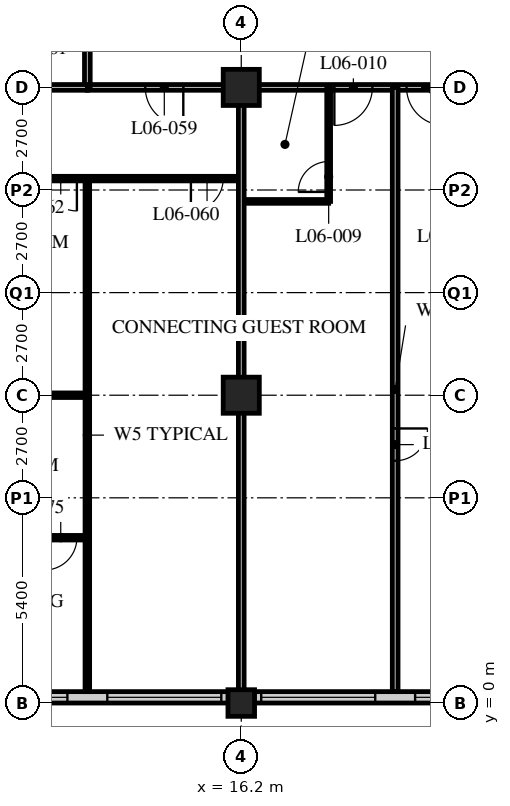
"""IFC4 building model, lengths in metres.
Left out: names, types, materials, properties, quantities, classifications, styles, units other than length and angle.
Written with IfcOpenShell. Run it as: python <this file> out.ifc"""

import sys

from ifc_helpers import new_model, si_unit, direction, frame, frame_2d, origin, origin_2d, place, context, subcontext, project, spatial, rectangle, hollow_rectangle, extrude, element, fill, save


model = new_model("IFC4")
c1 = context("Model", 3, precision=1e-05, world=origin(), true_north=direction((0.0, 1.0)))
c2 = subcontext(c1, "Body", "Model", "MODEL_VIEW")
j1 = project(units=[si_unit("LENGTHUNIT", "METRE"), si_unit("PLANEANGLEUNIT", "RADIAN")], contexts=[c1])
p1 = place(None, origin())
s1 = spatial("IfcSite", under=j1, at=p1, CompositionType="ELEMENT")
p2 = place(p1, origin())
s2 = spatial("IfcBuilding", under=s1, at=p2, CompositionType="ELEMENT")
p3 = place(p2, frame((0.0, 0.0, 33.0)))
s3 = spatial("IfcBuildingStorey", under=s2, at=p3, CompositionType="ELEMENT", Elevation=33.0)
p4 = place(p3, frame((16.2, 0.0, 0.0), z_axis=(0.0, 0.0, 1.0), x_axis=(1.0, 0.0, 0.0)))
e1 = element("IfcColumn", 1, at=p4, inside=s3, PredefinedType="COLUMN", context=c2, shape_type="SweptSolid", body=[
    extrude(hollow_rectangle(XDim=0.7, YDim=0.7, WallThickness=0.06, at=origin_2d()), origin(), (0.0, 0.0, 1.0), 3.4),
])
for number, where, z_axis, x_axis in (
    (2, (16.2, 8.1, 0.0), (0.0, 0.0, 1.0), (1.0, 0.0, 0.0)),
    (3, (16.2, 16.2, 0.0), (0.0, 0.0, 1.0), (1.0, 0.0, 0.0)),
):
    element("IfcColumn", number, at=place(p3, frame(where, z_axis=z_axis, x_axis=x_axis)), inside=s3, PredefinedType="COLUMN", context=c2, shape_type="SweptSolid", body=[
        extrude(hollow_rectangle(XDim=0.95, YDim=0.95, WallThickness=0.095, at=origin_2d()), origin(), (0.0, 0.0, 1.0), 3.4),
    ])
p5 = place(p3, frame((8.4, 0.15, 0.0), z_axis=(0.0, 0.0, 1.0), x_axis=(1.0, 0.0, 0.0)))
e4 = element("IfcWall", 4, at=p5, inside=s3, PredefinedType="SOLIDWALL", context=c2, shape_type="SweptSolid", body=[
    extrude(rectangle(XDim=40.2, YDim=0.3, at=frame_2d((20.1, 0.0))), origin(), (0.0, 0.0, 1.0), 3.19),
])
p6 = place(p5, frame((0.225, 0.0, 0.9)))
e5 = element("IfcOpeningElement", 5, at=p6, cuts=e4, PredefinedType="OPENING", context=c2, shape_type="SweptSolid", body=[
    extrude(rectangle(XDim=3.0, YDim=2.0, at=frame_2d((1.5, 1.0))), frame((0.0, 0.16, 0.0), z_axis=(0.0, -1.0, 0.0), x_axis=(1.0, 0.0, 0.0)), (0.0, 0.0, 1.0), 0.32),
])
p7 = place(p5, frame((4.275, 0.0, 0.9)))
e6 = element("IfcOpeningElement", 6, at=p7, cuts=e4, PredefinedType="OPENING", context=c2, shape_type="SweptSolid", body=[
    extrude(rectangle(XDim=3.0, YDim=2.0, at=frame_2d((1.5, 1.0))), frame((0.0, 0.16, 0.0), z_axis=(0.0, -1.0, 0.0), x_axis=(1.0, 0.0, 0.0)), (0.0, 0.0, 1.0), 0.32),
])
p8 = place(p5, frame((8.325, 0.0, 0.9)))
e7 = element("IfcOpeningElement", 7, at=p8, cuts=e4, PredefinedType="OPENING", context=c2, shape_type="SweptSolid", body=[
    extrude(rectangle(XDim=3.0, YDim=2.0, at=frame_2d((1.5, 1.0))), frame((0.0, 0.16, 0.0), z_axis=(0.0, -1.0, 0.0), x_axis=(1.0, 0.0, 0.0)), (0.0, 0.0, 1.0), 0.32),
])
p9 = place(p5, frame((12.375, 0.0, 0.9)))
e8 = element("IfcOpeningElement", 8, at=p9, cuts=e4, PredefinedType="OPENING", context=c2, shape_type="SweptSolid", body=[
    extrude(rectangle(XDim=3.0, YDim=2.0, at=frame_2d((1.5, 1.0))), frame((0.0, 0.16, 0.0), z_axis=(0.0, -1.0, 0.0), x_axis=(1.0, 0.0, 0.0)), (0.0, 0.0, 1.0), 0.32),
])
p10 = place(p5, frame((16.425, 0.0, 0.9)))
e9 = element("IfcOpeningElement", 9, at=p10, cuts=e4, PredefinedType="OPENING", context=c2, shape_type="SweptSolid", body=[
    extrude(rectangle(XDim=3.0, YDim=2.0, at=frame_2d((1.5, 1.0))), frame((0.0, 0.16, 0.0), z_axis=(0.0, -1.0, 0.0), x_axis=(1.0, 0.0, 0.0)), (0.0, 0.0, 1.0), 0.32),
])
p11 = place(p5, frame((20.475, 0.0, 0.9)))
e10 = element("IfcOpeningElement", 10, at=p11, cuts=e4, PredefinedType="OPENING", context=c2, shape_type="SweptSolid", body=[
    extrude(rectangle(XDim=3.0, YDim=2.0, at=frame_2d((1.5, 1.0))), frame((0.0, 0.16, 0.0), z_axis=(0.0, -1.0, 0.0), x_axis=(1.0, 0.0, 0.0)), (0.0, 0.0, 1.0), 0.32),
])
p12 = place(p5, frame((24.525, 0.0, 0.9)))
e11 = element("IfcOpeningElement", 11, at=p12, cuts=e4, PredefinedType="OPENING", context=c2, shape_type="SweptSolid", body=[
    extrude(rectangle(XDim=3.0, YDim=2.0, at=frame_2d((1.5, 1.0))), frame((0.0, 0.16, 0.0), z_axis=(0.0, -1.0, 0.0), x_axis=(1.0, 0.0, 0.0)), (0.0, 0.0, 1.0), 0.32),
])
p13 = place(p5, frame((28.575, 0.0, 0.9)))
e12 = element("IfcOpeningElement", 12, at=p13, cuts=e4, PredefinedType="OPENING", context=c2, shape_type="SweptSolid", body=[
    extrude(rectangle(XDim=3.0, YDim=2.0, at=frame_2d((1.5, 1.0))), frame((0.0, 0.16, 0.0), z_axis=(0.0, -1.0, 0.0), x_axis=(1.0, 0.0, 0.0)), (0.0, 0.0, 1.0), 0.32),
])
p14 = place(p5, frame((32.625, 0.0, 0.9)))
e13 = element("IfcOpeningElement", 13, at=p14, cuts=e4, PredefinedType="OPENING", context=c2, shape_type="SweptSolid", body=[
    extrude(rectangle(XDim=3.0, YDim=2.0, at=frame_2d((1.5, 1.0))), frame((0.0, 0.16, 0.0), z_axis=(0.0, -1.0, 0.0), x_axis=(1.0, 0.0, 0.0)), (0.0, 0.0, 1.0), 0.32),
])
p15 = place(p5, frame((36.675, 0.0, 0.9)))
e14 = element("IfcOpeningElement", 14, at=p15, cuts=e4, PredefinedType="OPENING", context=c2, shape_type="SweptSolid", body=[
    extrude(rectangle(XDim=3.0, YDim=2.0, at=frame_2d((1.5, 1.0))), frame((0.0, 0.16, 0.0), z_axis=(0.0, -1.0, 0.0), x_axis=(1.0, 0.0, 0.0)), (0.0, 0.0, 1.0), 0.32),
])
p16 = place(p3, frame((12.15, 16.2, 0.0), z_axis=(0.0, 0.0, 1.0), x_axis=(1.0, 0.0, 0.0)))
e15 = element("IfcWall", 15, at=p16, inside=s3, PredefinedType="PARTITIONING", context=c2, shape_type="SweptSolid", body=[
    extrude(rectangle(XDim=32.4, YDim=0.15, at=frame_2d((16.2, 0.0))), origin(), (0.0, 0.0, 1.0), 2.578),
])
p17 = place(p16, frame((6.5, 0.0, 0.0)))
e16 = element("IfcOpeningElement", 16, at=p17, cuts=e15, PredefinedType="OPENING", context=c2, shape_type="SweptSolid", body=[
    extrude(rectangle(XDim=1.0, YDim=2.1, at=frame_2d((0.5, 1.05))), frame((0.0, 0.085, 0.0), z_axis=(0.0, -1.0, 0.0), x_axis=(1.0, 0.0, 0.0)), (0.0, 0.0, 1.0), 0.17),
])
p18 = place(p16, frame((8.4, 0.0, 0.0)))
e17 = element("IfcOpeningElement", 17, at=p18, cuts=e15, PredefinedType="OPENING", context=c2, shape_type="SweptSolid", body=[
    extrude(rectangle(XDim=1.0, YDim=2.1, at=frame_2d((0.5, 1.05))), frame((0.0, 0.085, 0.0), z_axis=(0.0, -1.0, 0.0), x_axis=(1.0, 0.0, 0.0)), (0.0, 0.0, 1.0), 0.17),
])
p19 = place(p16, frame((14.6, 0.0, 0.0)))
e18 = element("IfcOpeningElement", 18, at=p19, cuts=e15, PredefinedType="OPENING", context=c2, shape_type="SweptSolid", body=[
    extrude(rectangle(XDim=1.0, YDim=2.1, at=frame_2d((0.5, 1.05))), frame((0.0, 0.085, 0.0), z_axis=(0.0, -1.0, 0.0), x_axis=(1.0, 0.0, 0.0)), (0.0, 0.0, 1.0), 0.17),
])
p20 = place(p16, frame((16.5, 0.0, 0.0)))
e19 = element("IfcOpeningElement", 19, at=p20, cuts=e15, PredefinedType="OPENING", context=c2, shape_type="SweptSolid", body=[
    extrude(rectangle(XDim=1.0, YDim=2.1, at=frame_2d((0.5, 1.05))), frame((0.0, 0.085, 0.0), z_axis=(0.0, -1.0, 0.0), x_axis=(1.0, 0.0, 0.0)), (0.0, 0.0, 1.0), 0.17),
])
p21 = place(p16, frame((23.0, 0.0, 0.0)))
e20 = element("IfcOpeningElement", 20, at=p21, cuts=e15, PredefinedType="OPENING", context=c2, shape_type="SweptSolid", body=[
    extrude(rectangle(XDim=1.0, YDim=2.1, at=frame_2d((0.5, 1.05))), frame((0.0, 0.085, 0.0), z_axis=(0.0, -1.0, 0.0), x_axis=(1.0, 0.0, 0.0)), (0.0, 0.0, 1.0), 0.17),
])
p22 = place(p16, frame((24.6, 0.0, 0.0)))
e21 = element("IfcOpeningElement", 21, at=p22, cuts=e15, PredefinedType="OPENING", context=c2, shape_type="SweptSolid", body=[
    extrude(rectangle(XDim=1.0, YDim=2.1, at=frame_2d((0.5, 1.05))), frame((0.0, 0.085, 0.0), z_axis=(0.0, -1.0, 0.0), x_axis=(1.0, 0.0, 0.0)), (0.0, 0.0, 1.0), 0.17),
])
p23 = place(p16, frame((1.525, 0.0, 0.0)))
e22 = element("IfcOpeningElement", 22, at=p23, cuts=e15, PredefinedType="OPENING", context=c2, shape_type="SweptSolid", body=[
    extrude(rectangle(XDim=1.0, YDim=2.1, at=frame_2d((0.5, 1.05))), frame((0.0, 0.085, 0.0), z_axis=(0.0, -1.0, 0.0), x_axis=(1.0, 0.0, 0.0)), (0.0, 0.0, 1.0), 0.17),
])
p24 = place(p16, frame((29.875, 0.0, 0.0)))
e23 = element("IfcOpeningElement", 23, at=p24, cuts=e15, PredefinedType="OPENING", context=c2, shape_type="SweptSolid", body=[
    extrude(rectangle(XDim=1.0, YDim=2.1, at=frame_2d((0.5, 1.05))), frame((0.0, 0.085, 0.0), z_axis=(0.0, -1.0, 0.0), x_axis=(1.0, 0.0, 0.0)), (0.0, 0.0, 1.0), 0.17),
])
p25 = place(p3, frame((12.15, 16.2, 0.0), z_axis=(0.0, 0.0, 1.0), x_axis=(0.0, 1.0, 0.0)))
e24 = element("IfcWall", 24, at=p25, inside=s3, PredefinedType="PARTITIONING", context=c2, shape_type="SweptSolid", body=[
    extrude(rectangle(XDim=26.1, YDim=0.15, at=frame_2d((13.05, 0.0))), origin(), (0.0, 0.0, 1.0), 3.19),
])
p26 = place(p25, frame((2.75, 0.0, 0.0)))
e25 = element("IfcOpeningElement", 25, at=p26, cuts=e24, PredefinedType="OPENING", context=c2, shape_type="SweptSolid", body=[
    extrude(rectangle(XDim=1.0, YDim=2.1, at=frame_2d((0.5, 1.05))), frame((0.0, 0.085, 0.0), z_axis=(0.0, -1.0, 0.0), x_axis=(1.0, 0.0, 0.0)), (0.0, 0.0, 1.0), 0.17),
])
p27 = place(p25, frame((4.35, 0.0, 0.0)))
e26 = element("IfcOpeningElement", 26, at=p27, cuts=e24, PredefinedType="OPENING", context=c2, shape_type="SweptSolid", body=[
    extrude(rectangle(XDim=1.0, YDim=2.1, at=frame_2d((0.5, 1.05))), frame((0.0, 0.085, 0.0), z_axis=(0.0, -1.0, 0.0), x_axis=(1.0, 0.0, 0.0)), (0.0, 0.0, 1.0), 0.17),
])
p28 = place(p25, frame((10.55, 0.0, 0.0)))
e27 = element("IfcOpeningElement", 27, at=p28, cuts=e24, PredefinedType="OPENING", context=c2, shape_type="SweptSolid", body=[
    extrude(rectangle(XDim=1.0, YDim=2.1, at=frame_2d((0.5, 1.05))), frame((0.0, 0.085, 0.0), z_axis=(0.0, -1.0, 0.0), x_axis=(1.0, 0.0, 0.0)), (0.0, 0.0, 1.0), 0.17),
])
p29 = place(p25, frame((12.45, 0.0, 0.0)))
e28 = element("IfcOpeningElement", 28, at=p29, cuts=e24, PredefinedType="OPENING", context=c2, shape_type="SweptSolid", body=[
    extrude(rectangle(XDim=1.0, YDim=2.1, at=frame_2d((0.5, 1.05))), frame((0.0, 0.085, 0.0), z_axis=(0.0, -1.0, 0.0), x_axis=(1.0, 0.0, 0.0)), (0.0, 0.0, 1.0), 0.17),
])
p30 = place(p25, frame((18.65, 0.0, 0.0)))
e29 = element("IfcOpeningElement", 29, at=p30, cuts=e24, PredefinedType="OPENING", context=c2, shape_type="SweptSolid", body=[
    extrude(rectangle(XDim=1.0, YDim=2.1, at=frame_2d((0.5, 1.05))), frame((0.0, 0.085, 0.0), z_axis=(0.0, -1.0, 0.0), x_axis=(1.0, 0.0, 0.0)), (0.0, 0.0, 1.0), 0.17),
])
p31 = place(p25, frame((22.65, 0.0, 0.0)))
e30 = element("IfcOpeningElement", 30, at=p31, cuts=e24, PredefinedType="OPENING", context=c2, shape_type="SweptSolid", body=[
    extrude(rectangle(XDim=1.0, YDim=2.1, at=frame_2d((0.5, 1.05))), frame((0.0, 0.085, 0.0), z_axis=(0.0, -1.0, 0.0), x_axis=(1.0, 0.0, 0.0)), (0.0, 0.0, 1.0), 0.17),
])
p32 = place(p3, frame((16.2, 13.2, 0.0), z_axis=(0.0, 0.0, 1.0), x_axis=(1.0, 0.0, 0.0)))
e31 = element("IfcWall", 31, at=p32, inside=s3, PredefinedType="PARTITIONING", context=c2, shape_type="SweptSolid", body=[
    extrude(rectangle(XDim=2.3, YDim=0.1, at=frame_2d((1.15, 0.0))), origin(), (0.0, 0.0, 1.0), 3.19),
])
p33 = place(p3, frame((18.5, 16.2, 0.0), z_axis=(0.0, 0.0, 1.0), x_axis=(0.0, -1.0, 0.0)))
e32 = element("IfcWall", 32, at=p33, inside=s3, PredefinedType="PARTITIONING", context=c2, shape_type="SweptSolid", body=[
    extrude(rectangle(XDim=3.0, YDim=0.1, at=frame_2d((1.5, 0.0))), origin(), (0.0, 0.0, 1.0), 3.19),
])
p34 = place(p33, frame((1.95, 0.0, 0.0)))
e33 = element("IfcOpeningElement", 33, at=p34, cuts=e32, PredefinedType="OPENING", context=c2, shape_type="SweptSolid", body=[
    extrude(rectangle(XDim=0.8, YDim=2.1, at=frame_2d((0.4, 1.05))), frame((0.0, 0.06, 0.0), z_axis=(0.0, -1.0, 0.0), x_axis=(1.0, 0.0, 0.0)), (0.0, 0.0, 1.0), 0.12),
])
p35 = place(p3, frame((20.25, 16.2, 0.0), z_axis=(0.0, 0.0, 1.0), x_axis=(0.0, -1.0, 0.0)))
e34 = element("IfcWall", 34, at=p35, inside=s3, PredefinedType="PARTITIONING", context=c2, shape_type="SweptSolid", body=[
    extrude(rectangle(XDim=15.9, YDim=0.15, at=frame_2d((7.95, 0.0))), origin(), (0.0, 0.0, 1.0), 3.19),
])
p36 = place(p35, frame((8.975, 0.0, 0.0)))
e35 = element("IfcOpeningElement", 35, at=p36, cuts=e34, PredefinedType="OPENING", context=c2, shape_type="SweptSolid", body=[
    extrude(rectangle(XDim=0.85, YDim=2.1, at=frame_2d((0.425, 1.05))), frame((0.0, 0.085, 0.0), z_axis=(0.0, -1.0, 0.0), x_axis=(1.0, 0.0, 0.0)), (0.0, 0.0, 1.0), 0.17),
])
p37 = place(p3, frame((8.15, 13.8, 0.0), z_axis=(0.0, 0.0, 1.0), x_axis=(1.0, 0.0, 0.0)))
e36 = element("IfcWall", 36, at=p37, inside=s3, PredefinedType="PARTITIONING", context=c2, shape_type="SweptSolid", body=[
    extrude(rectangle(XDim=8.05, YDim=0.12, at=frame_2d((4.025, 0.0))), origin(), (0.0, 0.0, 1.0), 3.19),
])
p38 = place(p37, frame((6.725, 0.0, 0.0)))
e37 = element("IfcOpeningElement", 37, at=p38, cuts=e36, PredefinedType="OPENING", context=c2, shape_type="SweptSolid", body=[
    extrude(rectangle(XDim=0.85, YDim=2.1, at=frame_2d((0.425, 1.05))), frame((0.0, 0.07, 0.0), z_axis=(0.0, -1.0, 0.0), x_axis=(1.0, 0.0, 0.0)), (0.0, 0.0, 1.0), 0.14),
])
p39 = place(p37, frame((2.875, 0.0, 0.0)))
e38 = element("IfcOpeningElement", 38, at=p39, cuts=e36, PredefinedType="OPENING", context=c2, shape_type="SweptSolid", body=[
    extrude(rectangle(XDim=0.85, YDim=2.1, at=frame_2d((0.425, 1.05))), frame((0.0, 0.07, 0.0), z_axis=(0.0, -1.0, 0.0), x_axis=(1.0, 0.0, 0.0)), (0.0, 0.0, 1.0), 0.14),
])
p40 = place(p3, frame((12.15, 13.8, 0.0), z_axis=(0.0, 0.0, 1.0), x_axis=(0.0, -1.0, 0.0)))
e39 = element("IfcWall", 39, at=p40, inside=s3, PredefinedType="PARTITIONING", context=c2, shape_type="SweptSolid", body=[
    extrude(rectangle(XDim=13.5, YDim=0.12, at=frame_2d((6.75, 0.0))), origin(), (0.0, 0.0, 1.0), 3.19),
])
p41 = place(p3, frame((12.15, 8.1, 0.0), z_axis=(0.0, 0.0, 1.0), x_axis=(-1.0, 0.0, 0.0)))
e40 = element("IfcWall", 40, at=p41, inside=s3, PredefinedType="PARTITIONING", context=c2, shape_type="SweptSolid", body=[
    extrude(rectangle(XDim=7.8, YDim=0.12, at=frame_2d((3.9, 0.0))), origin(), (0.0, 0.0, 1.0), 2.578),
])
p42 = place(p41, frame((1.875, 0.0, 0.0)))
e41 = element("IfcOpeningElement", 41, at=p42, cuts=e40, PredefinedType="OPENING", context=c2, shape_type="SweptSolid", body=[
    extrude(rectangle(XDim=0.85, YDim=2.1, at=frame_2d((0.425, 1.05))), frame((0.0, 0.07, 0.0), z_axis=(0.0, -1.0, 0.0), x_axis=(1.0, 0.0, 0.0)), (0.0, 0.0, 1.0), 0.14),
])
p43 = place(p3, frame((0.3, 16.2, 0.0), z_axis=(0.0, 0.0, 1.0), x_axis=(1.0, 0.0, 0.0)))
e42 = element("IfcWall", 42, at=p43, inside=s3, PredefinedType="PARTITIONING", context=c2, shape_type="SweptSolid", body=[
    extrude(rectangle(XDim=11.85, YDim=0.15, at=frame_2d((5.925, 0.0))), origin(), (0.0, 0.0, 1.0), 2.578),
])
p44 = place(p3, frame((16.2, 16.2, 0.0), z_axis=(0.0, 0.0, 1.0), x_axis=(0.0, -1.0, 0.0)))
e43 = element("IfcWall", 43, at=p44, inside=s3, PredefinedType="PARTITIONING", context=c2, shape_type="SweptSolid", body=[
    extrude(rectangle(XDim=15.9, YDim=0.15, at=frame_2d((7.95, 0.0))), origin(), (0.0, 0.0, 1.0), 2.578),
])
p45 = place(p3, frame((8.39, 4.35, 0.0), z_axis=(0.0, 0.0, 1.0), x_axis=(1.0, 0.0, 0.0)))
e44 = element("IfcWall", 44, at=p45, inside=s3, PredefinedType="PARTITIONING", context=c2, shape_type="SweptSolid", body=[
    extrude(rectangle(XDim=3.76, YDim=0.12, at=frame_2d((1.88, 0.0))), origin(), (0.0, 0.0, 1.0), 3.19),
])
p46 = place(p45, frame((2.635, 0.0, 0.0)))
e45 = element("IfcOpeningElement", 45, at=p46, cuts=e44, PredefinedType="OPENING", context=c2, shape_type="SweptSolid", body=[
    extrude(rectangle(XDim=0.85, YDim=2.1, at=frame_2d((0.425, 1.05))), frame((0.0, 0.07, 0.0), z_axis=(0.0, -1.0, 0.0), x_axis=(1.0, 0.0, 0.0)), (0.0, 0.0, 1.0), 0.14),
])
p47 = place(p6, origin())
e46 = element("IfcWindow", 46, at=p47, inside=s3, PartitioningType="SINGLE_PANEL", PredefinedType="WINDOW", context=c2, shape_type="SweptSolid", body=[
    extrude(rectangle(XDim=3.0, YDim=2.0, at=frame_2d((1.5, 1.0))), frame((0.0, 0.03, 0.0), z_axis=(0.0, -1.0, 0.0), x_axis=(1.0, 0.0, 0.0)), (0.0, 0.0, 1.0), 0.06),
])
fill(e5, e46)
p48 = place(p7, origin())
e47 = element("IfcWindow", 47, at=p48, inside=s3, PartitioningType="SINGLE_PANEL", PredefinedType="WINDOW", context=c2, shape_type="SweptSolid", body=[
    extrude(rectangle(XDim=3.0, YDim=2.0, at=frame_2d((1.5, 1.0))), frame((0.0, 0.03, 0.0), z_axis=(0.0, -1.0, 0.0), x_axis=(1.0, 0.0, 0.0)), (0.0, 0.0, 1.0), 0.06),
])
fill(e6, e47)
p49 = place(p8, origin())
e48 = element("IfcWindow", 48, at=p49, inside=s3, PartitioningType="SINGLE_PANEL", PredefinedType="WINDOW", context=c2, shape_type="SweptSolid", body=[
    extrude(rectangle(XDim=3.0, YDim=2.0, at=frame_2d((1.5, 1.0))), frame((0.0, 0.03, 0.0), z_axis=(0.0, -1.0, 0.0), x_axis=(1.0, 0.0, 0.0)), (0.0, 0.0, 1.0), 0.06),
])
fill(e7, e48)
p50 = place(p9, origin())
e49 = element("IfcWindow", 49, at=p50, inside=s3, PartitioningType="SINGLE_PANEL", PredefinedType="WINDOW", context=c2, shape_type="SweptSolid", body=[
    extrude(rectangle(XDim=3.0, YDim=2.0, at=frame_2d((1.5, 1.0))), frame((0.0, 0.03, 0.0), z_axis=(0.0, -1.0, 0.0), x_axis=(1.0, 0.0, 0.0)), (0.0, 0.0, 1.0), 0.06),
])
fill(e8, e49)
p51 = place(p34, origin())
e50 = element("IfcDoor", 50, at=p51, inside=s3, OperationType="SINGLE_SWING_LEFT", PredefinedType="DOOR", context=c2, shape_type="SweptSolid", body=[
    extrude(rectangle(XDim=0.8, YDim=2.1, at=frame_2d((0.4, 1.05))), frame((0.0, 0.025, 0.0), z_axis=(0.0, -1.0, 0.0), x_axis=(1.0, 0.0, 0.0)), (0.0, 0.0, 1.0), 0.05),
])
fill(e33, e50)
p52 = place(p17, origin())
e51 = element("IfcDoor", 51, at=p52, inside=s3, OperationType="SINGLE_SWING_RIGHT", PredefinedType="DOOR", context=c2, shape_type="SweptSolid", body=[
    extrude(rectangle(XDim=1.0, YDim=2.1, at=frame_2d((0.5, 1.05))), frame((0.0, 0.025, 0.0), z_axis=(0.0, -1.0, 0.0), x_axis=(1.0, 0.0, 0.0)), (0.0, 0.0, 1.0), 0.05),
])
fill(e16, e51)
p53 = place(p18, origin())
e52 = element("IfcDoor", 52, at=p53, inside=s3, OperationType="SINGLE_SWING_LEFT", PredefinedType="DOOR", context=c2, shape_type="SweptSolid", body=[
    extrude(rectangle(XDim=1.0, YDim=2.1, at=frame_2d((0.5, 1.05))), frame((0.0, 0.025, 0.0), z_axis=(0.0, -1.0, 0.0), x_axis=(1.0, 0.0, 0.0)), (0.0, 0.0, 1.0), 0.05),
])
fill(e17, e52)
p54 = place(p36, origin())
e53 = element("IfcDoor", 53, at=p54, inside=s3, OperationType="SINGLE_SWING_LEFT", PredefinedType="DOOR", context=c2, shape_type="SweptSolid", body=[
    extrude(rectangle(XDim=0.85, YDim=2.1, at=frame_2d((0.425, 1.05))), frame((0.0, 0.025, 0.0), z_axis=(0.0, -1.0, 0.0), x_axis=(1.0, 0.0, 0.0)), (0.0, 0.0, 1.0), 0.05),
])
fill(e35, e53)
p55 = place(p23, origin())
e54 = element("IfcDoor", 54, at=p55, inside=s3, OperationType="SINGLE_SWING_LEFT", PredefinedType="DOOR", context=c2, shape_type="SweptSolid", body=[
    extrude(rectangle(XDim=1.0, YDim=2.1, at=frame_2d((0.5, 1.05))), frame((0.0, 0.025, 0.0), z_axis=(0.0, -1.0, 0.0), x_axis=(1.0, 0.0, 0.0)), (0.0, 0.0, 1.0), 0.05),
])
fill(e22, e54)
p56 = place(p38, origin())
e55 = element("IfcDoor", 55, at=p56, inside=s3, OperationType="SINGLE_SWING_RIGHT", PredefinedType="DOOR", context=c2, shape_type="SweptSolid", body=[
    extrude(rectangle(XDim=0.85, YDim=2.1, at=frame_2d((0.425, 1.05))), frame((0.0, 0.025, 0.0), z_axis=(0.0, -1.0, 0.0), x_axis=(1.0, 0.0, 0.0)), (0.0, 0.0, 1.0), 0.05),
])
fill(e37, e55)
p57 = place(p39, origin())
e56 = element("IfcDoor", 56, at=p57, inside=s3, OperationType="SINGLE_SWING_LEFT", PredefinedType="DOOR", context=c2, shape_type="SweptSolid", body=[
    extrude(rectangle(XDim=0.85, YDim=2.1, at=frame_2d((0.425, 1.05))), frame((0.0, 0.025, 0.0), z_axis=(0.0, -1.0, 0.0), x_axis=(1.0, 0.0, 0.0)), (0.0, 0.0, 1.0), 0.05),
])
fill(e38, e56)
p58 = place(p46, origin())
e57 = element("IfcDoor", 57, at=p58, inside=s3, OperationType="SINGLE_SWING_RIGHT", PredefinedType="DOOR", context=c2, shape_type="SweptSolid", body=[
    extrude(rectangle(XDim=0.85, YDim=2.1, at=frame_2d((0.425, 1.05))), frame((0.0, 0.025, 0.0), z_axis=(0.0, -1.0, 0.0), x_axis=(1.0, 0.0, 0.0)), (0.0, 0.0, 1.0), 0.05),
])
fill(e45, e57)
save(model, sys.argv[1])
